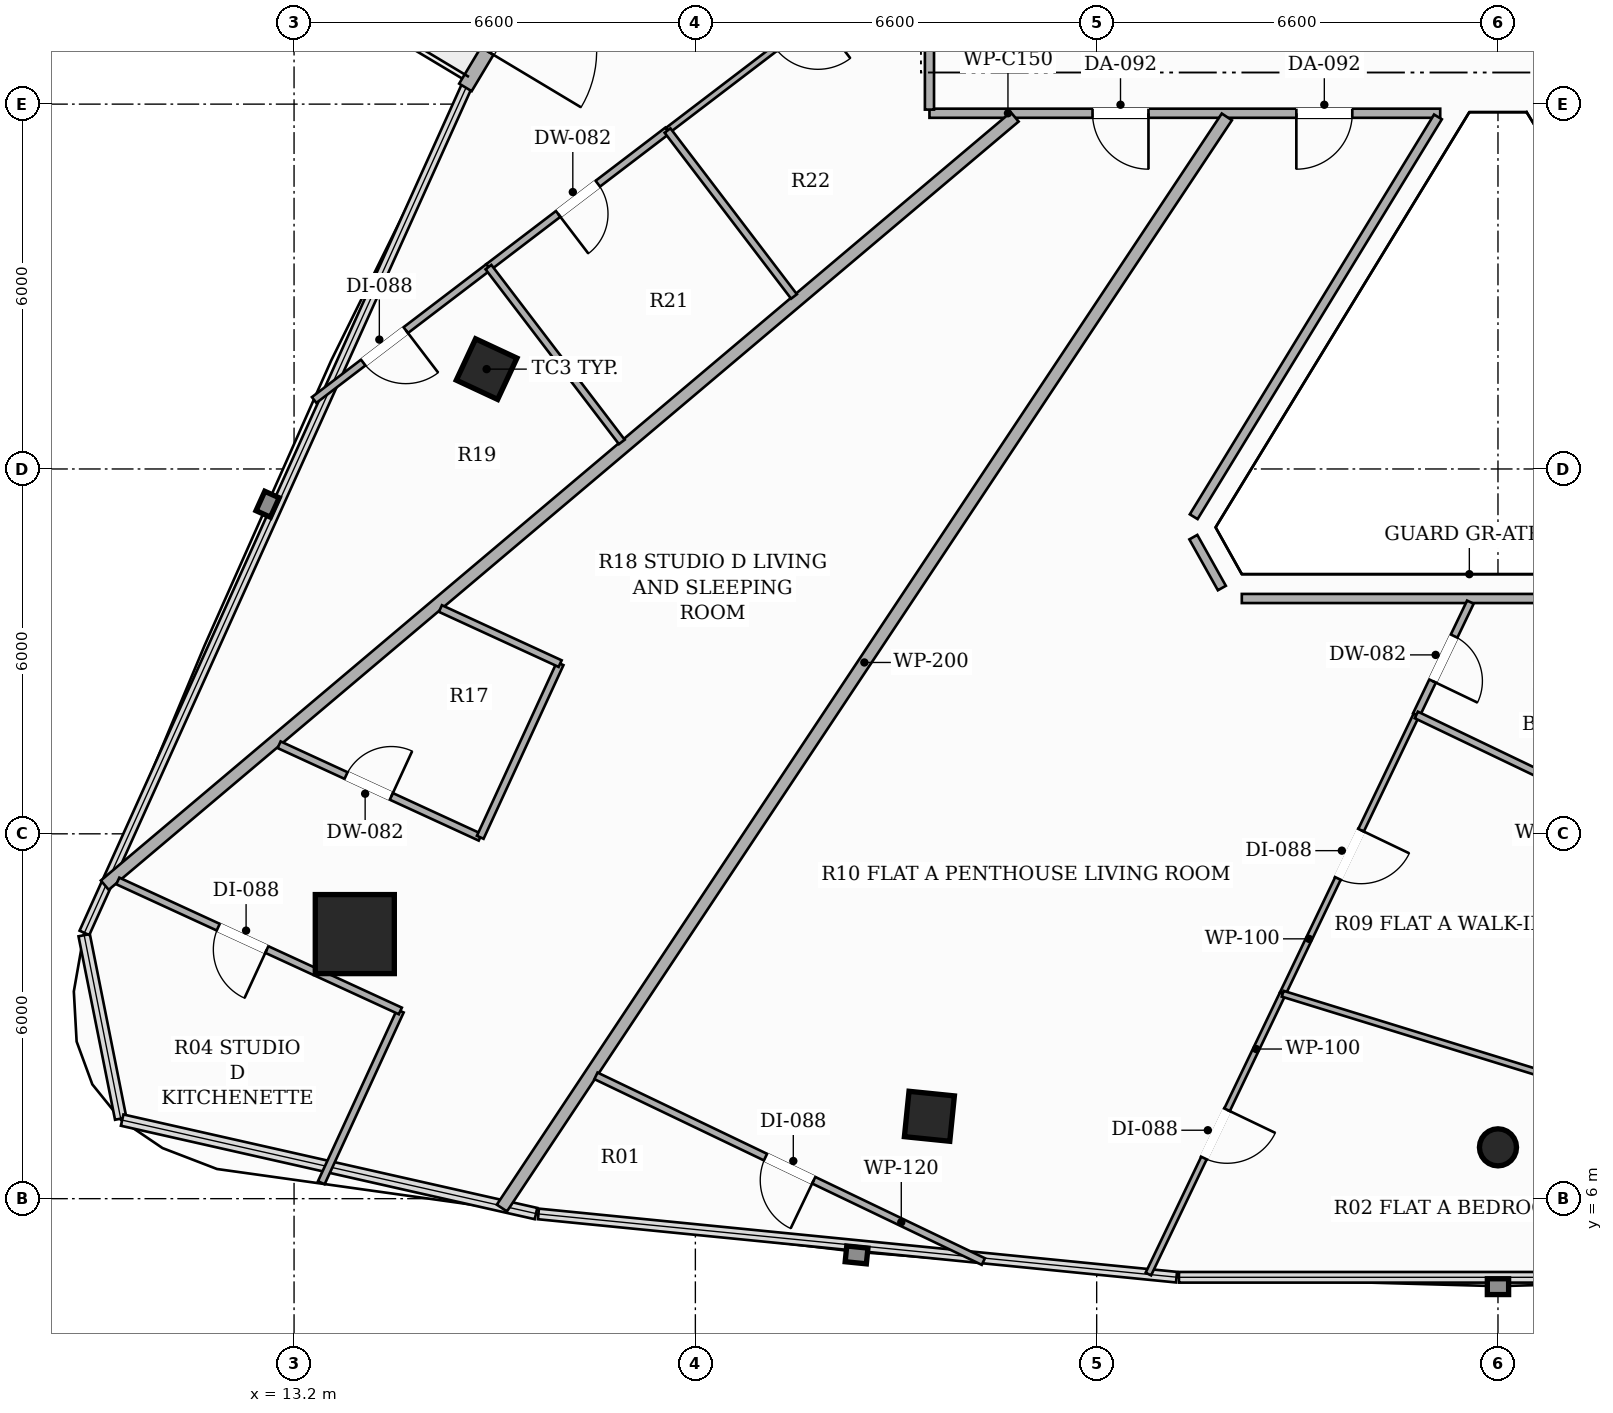
"""IFC4 building model, lengths in metres.
Left out: names, types, materials, properties, quantities, classifications, styles, units other than length and angle.
Written with IfcOpenShell. Run it as: python <this file> out.ifc"""

import sys

from ifc_helpers import new_model, si_unit, direction, frame, frame_2d, origin, origin_2d, place, context, subcontext, project, spatial, rectangle, hollow_rectangle, hollow_circle, extrude, element, fill, save


model = new_model("IFC4")
c1 = context("Model", 3, precision=1e-05, world=origin(), true_north=direction((0.0, 1.0)))
c2 = subcontext(c1, "Body", "Model", "MODEL_VIEW")
j1 = project(units=[si_unit("LENGTHUNIT", "METRE"), si_unit("PLANEANGLEUNIT", "RADIAN")], contexts=[c1])
p1 = place(None, origin())
s1 = spatial("IfcSite", under=j1, at=p1, CompositionType="ELEMENT")
p2 = place(p1, origin())
s2 = spatial("IfcBuilding", under=s1, at=p2, CompositionType="ELEMENT")
p3 = place(p2, frame((0.0, 0.0, 206.3)))
s3 = spatial("IfcBuildingStorey", under=s2, at=p3, CompositionType="ELEMENT", Elevation=206.3)
p4 = place(p3, frame((14.199, 10.351, 0.0), z_axis=(0.0, 0.0, 1.0), x_axis=(1.0, 0.0, 0.0)))
e1 = element("IfcColumn", 1, at=p4, inside=s3, PredefinedType="COLUMN", context=c2, shape_type="SweptSolid", body=[
    extrude(hollow_rectangle(XDim=1.3, YDim=1.3, WallThickness=0.04, at=origin_2d()), origin(), (0.0, 0.0, 1.0), 3.3),
])
for number, where, z_axis, x_axis in (
    (2, (16.367, 19.642, 0.0), (0.0, 0.0, 1.0), (0.423, 0.906, 0.0)),
    (3, (23.649, 7.355, 0.0), (0.0, 0.0, 1.0), (-0.995, 0.101, 0.0)),
):
    element("IfcColumn", number, at=place(p3, frame(where, z_axis=z_axis, x_axis=x_axis)), inside=s3, PredefinedType="COLUMN", context=c2, shape_type="SweptSolid", body=[
        extrude(hollow_rectangle(XDim=0.75, YDim=0.75, WallThickness=0.025, at=origin_2d()), origin(), (0.0, 0.0, 1.0), 3.3),
    ])
p5 = place(p3, frame((33.0, 6.844, 0.0), z_axis=(0.0, 0.0, 1.0), x_axis=(1.0, 0.0, 0.0)))
e4 = element("IfcColumn", 4, at=p5, inside=s3, PredefinedType="COLUMN", context=c2, shape_type="SweptSolid", body=[
    extrude(hollow_circle(Radius=0.305, WallThickness=0.016, at=origin_2d()), origin(), (0.0, 0.0, 1.0), 3.3),
])
p6 = place(p3, frame((21.353, 33.169, 0.0), z_axis=(0.0, 0.0, 1.0), x_axis=(-0.514391899557, -0.857555230682, 0.0)))
e5 = element("IfcWall", 5, at=p6, inside=s3, PredefinedType="SOLIDWALL", context=c2, shape_type="SweptSolid", body=[
    extrude(rectangle(XDim=10.371, YDim=0.24, at=frame_2d((5.186, 0.0))), origin(), (0.0, 0.0, 1.0), 2.624),
])
p7 = place(p6, frame((7.874, 0.0, 0.0)))
e6 = element("IfcOpeningElement", 6, at=p7, cuts=e5, PredefinedType="OPENING", context=c2, shape_type="SweptSolid", body=[
    extrude(rectangle(XDim=1.8, YDim=2.2, at=frame_2d((0.9, 1.1))), frame((0.0, 0.13, 0.0), z_axis=(0.0, -1.0, 0.0), x_axis=(1.0, 0.0, 0.0)), (0.0, 0.0, 1.0), 0.26),
])
p8 = place(p3, frame((32.05, 23.85, 0.0), z_axis=(0.0, 0.0, 1.0), x_axis=(-1.0, 0.0, 0.0)))
e7 = element("IfcWall", 7, at=p8, inside=s3, PredefinedType="PARTITIONING", context=c2, shape_type="SweptSolid", body=[
    extrude(rectangle(XDim=8.4, YDim=0.15, at=frame_2d((4.2, 0.0))), origin(), (0.0, 0.0, 1.0), 2.565),
])
p9 = place(p8, frame((1.446, 0.0, 0.0)))
e8 = element("IfcOpeningElement", 8, at=p9, cuts=e7, PredefinedType="OPENING", context=c2, shape_type="SweptSolid", body=[
    extrude(rectangle(XDim=0.92, YDim=2.15, at=frame_2d((0.46, 1.075))), frame((0.0, 0.085, 0.0), z_axis=(0.0, -1.0, 0.0), x_axis=(1.0, 0.0, 0.0)), (0.0, 0.0, 1.0), 0.17),
])
p10 = place(p8, frame((4.798, 0.0, 0.0)))
e9 = element("IfcOpeningElement", 9, at=p10, cuts=e7, PredefinedType="OPENING", context=c2, shape_type="SweptSolid", body=[
    extrude(rectangle(XDim=0.92, YDim=2.15, at=frame_2d((0.46, 1.075))), frame((0.0, 0.085, 0.0), z_axis=(0.0, -1.0, 0.0), x_axis=(1.0, 0.0, 0.0)), (0.0, 0.0, 1.0), 0.17),
])
p11 = place(p3, frame((23.65, 23.91, 0.0), z_axis=(0.0, 0.0, 1.0), x_axis=(0.0, 1.0, 0.0)))
e10 = element("IfcWall", 10, at=p11, inside=s3, PredefinedType="PARTITIONING", context=c2, shape_type="SweptSolid", body=[
    extrude(rectangle(XDim=12.439, YDim=0.15, at=frame_2d((6.22, 0.0))), origin(), (0.0, 0.0, 1.0), 2.492),
])
p12 = place(p11, frame((5.759, 0.0, 0.0)))
e11 = element("IfcOpeningElement", 11, at=p12, cuts=e10, PredefinedType="OPENING", context=c2, shape_type="SweptSolid", body=[
    extrude(rectangle(XDim=0.92, YDim=2.15, at=frame_2d((0.46, 1.075))), frame((0.0, 0.085, 0.0), z_axis=(0.0, -1.0, 0.0), x_axis=(1.0, 0.0, 0.0)), (0.0, 0.0, 1.0), 0.17),
])
p13 = place(p3, frame((37.213, 15.87, 0.0), z_axis=(0.0, 0.0, 1.0), x_axis=(-1.0, 0.0, 0.0)))
e12 = element("IfcWall", 12, at=p13, inside=s3, PredefinedType="PARTITIONING", context=c2, shape_type="SweptSolid", body=[
    extrude(rectangle(XDim=8.426, YDim=0.15, at=frame_2d((4.213, 0.0))), origin(), (0.0, 0.0, 1.0), 2.773),
])
p14 = place(p3, frame((28.459, 16.042, 0.0), z_axis=(0.0, 0.0, 1.0), x_axis=(-0.488859069364, 0.872362774481, 0.0)))
e13 = element("IfcWall", 13, at=p14, inside=s3, PredefinedType="PARTITIONING", context=c2, shape_type="SweptSolid", body=[
    extrude(rectangle(XDim=0.959, YDim=0.15, at=frame_2d((0.48, 0.0))), origin(), (0.0, 0.0, 1.0), 3.06),
])
p15 = place(p3, frame((27.996, 17.215, 0.0), z_axis=(0.0, 0.0, 1.0), x_axis=(0.521338496894, 0.853349970209, 0.0)))
e14 = element("IfcWall", 14, at=p15, inside=s3, PredefinedType="PARTITIONING", context=c2, shape_type="SweptSolid", body=[
    extrude(rectangle(XDim=7.705, YDim=0.15, at=frame_2d((3.853, 0.0))), origin(), (0.0, 0.0, 1.0), 2.773),
])
p16 = place(p3, frame((16.618, 5.846, 0.0), z_axis=(0.0, 0.0, 1.0), x_axis=(0.553425992232, 0.832898355817, 0.0)))
e15 = element("IfcWall", 15, at=p16, inside=s3, PredefinedType="PARTITIONING", context=c2, shape_type="SweptSolid", body=[
    extrude(rectangle(XDim=21.544, YDim=0.2, at=frame_2d((10.772, 0.0))), origin(), (0.0, 0.0, 1.0), 2.492),
])
p17 = place(p3, frame((10.087, 11.156, 0.0), z_axis=(0.0, 0.0, 1.0), x_axis=(0.76410924632, 0.645086862127, 0.0)))
e16 = element("IfcWall", 16, at=p17, inside=s3, PredefinedType="PARTITIONING", context=c2, shape_type="SweptSolid", body=[
    extrude(rectangle(XDim=19.585, YDim=0.2, at=frame_2d((9.792, 0.0))), origin(), (0.0, 0.0, 1.0), 2.492),
])
p18 = place(p3, frame((32.546, 15.81, 0.0), z_axis=(0.0, 0.0, 1.0), x_axis=(-0.43214833388, -0.90180253799, 0.0)))
e17 = element("IfcWall", 17, at=p18, inside=s3, PredefinedType="PARTITIONING", context=c2, shape_type="SweptSolid", body=[
    extrude(rectangle(XDim=2.057, YDim=0.12, at=frame_2d((1.028, 0.0))), origin(), (0.0, 0.0, 1.0), 3.06),
])
p19 = place(p18, frame((0.619, 0.0, 0.0)))
e18 = element("IfcOpeningElement", 18, at=p19, cuts=e17, PredefinedType="OPENING", context=c2, shape_type="SweptSolid", body=[
    extrude(rectangle(XDim=0.82, YDim=2.1, at=frame_2d((0.41, 1.05))), frame((0.0, 0.07, 0.0), z_axis=(0.0, -1.0, 0.0), x_axis=(1.0, 0.0, 0.0)), (0.0, 0.0, 1.0), 0.14),
])
p20 = place(p3, frame((24.536, 4.966, 0.0), z_axis=(0.0, 0.0, 1.0), x_axis=(-0.901746721557, 0.432264791721, 0.0)))
e19 = element("IfcWall", 19, at=p20, inside=s3, PredefinedType="PARTITIONING", context=c2, shape_type="SweptSolid", body=[
    extrude(rectangle(XDim=7.065, YDim=0.12, at=frame_2d((3.532, 0.0))), origin(), (0.0, 0.0, 1.0), 2.619),
])
p21 = place(p20, frame((3.093, 0.0, 0.0)))
e20 = element("IfcOpeningElement", 20, at=p21, cuts=e19, PredefinedType="OPENING", context=c2, shape_type="SweptSolid", body=[
    extrude(rectangle(XDim=0.88, YDim=2.1, at=frame_2d((0.44, 1.05))), frame((0.0, 0.07, 0.0), z_axis=(0.0, -1.0, 0.0), x_axis=(1.0, 0.0, 0.0)), (0.0, 0.0, 1.0), 0.14),
])
p22 = place(p3, frame((29.459, 9.37, 0.0), z_axis=(0.0, 0.0, 1.0), x_axis=(-0.43211613455, -0.901817967364, 0.0)))
e21 = element("IfcWall", 21, at=p22, inside=s3, PredefinedType="PARTITIONING", context=c2, shape_type="SweptSolid", body=[
    extrude(rectangle(XDim=5.112, YDim=0.1, at=frame_2d((2.556, 0.0))), origin(), (0.0, 0.0, 1.0), 2.492),
])
p23 = place(p22, frame((2.116, 0.0, 0.0)))
e22 = element("IfcOpeningElement", 22, at=p23, cuts=e21, PredefinedType="OPENING", context=c2, shape_type="SweptSolid", body=[
    extrude(rectangle(XDim=0.88, YDim=2.1, at=frame_2d((0.44, 1.05))), frame((0.0, 0.06, 0.0), z_axis=(0.0, -1.0, 0.0), x_axis=(1.0, 0.0, 0.0)), (0.0, 0.0, 1.0), 0.12),
])
p24 = place(p3, frame((31.657, 13.955, 0.0), z_axis=(0.0, 0.0, 1.0), x_axis=(-0.4322861352, -0.901736489954, 0.0)))
e23 = element("IfcWall", 23, at=p24, inside=s3, PredefinedType="PARTITIONING", context=c2, shape_type="SweptSolid", body=[
    extrude(rectangle(XDim=5.084, YDim=0.1, at=frame_2d((2.542, 0.0))), origin(), (0.0, 0.0, 1.0), 3.06),
])
p25 = place(p24, frame((2.102, 0.0, 0.0)))
e24 = element("IfcOpeningElement", 24, at=p25, cuts=e23, PredefinedType="OPENING", context=c2, shape_type="SweptSolid", body=[
    extrude(rectangle(XDim=0.88, YDim=2.1, at=frame_2d((0.44, 1.05))), frame((0.0, 0.06, 0.0), z_axis=(0.0, -1.0, 0.0), x_axis=(1.0, 0.0, 0.0)), (0.0, 0.0, 1.0), 0.12),
])
p26 = place(p3, frame((36.133, 11.81, 0.0), z_axis=(0.0, 0.0, 1.0), x_axis=(-0.901797658679, 0.432158515826, 0.0)))
e25 = element("IfcWall", 25, at=p26, inside=s3, PredefinedType="PARTITIONING", context=c2, shape_type="SweptSolid", body=[
    extrude(rectangle(XDim=4.964, YDim=0.12, at=frame_2d((2.482, 0.0))), origin(), (0.0, 0.0, 1.0), 2.773),
])
p27 = place(p3, frame((29.459, 9.37, 0.0), z_axis=(0.0, 0.0, 1.0), x_axis=(0.955559226726, -0.294799193044, 0.0)))
e26 = element("IfcWall", 26, at=p27, inside=s3, PredefinedType="PARTITIONING", context=c2, shape_type="SweptSolid", body=[
    extrude(rectangle(XDim=7.839, YDim=0.1, at=frame_2d((3.92, 0.0))), origin(), (0.0, 0.0, 1.0), 2.492),
])
p28 = place(p3, frame((12.954, 13.465, 0.0), z_axis=(0.0, 0.0, 1.0), x_axis=(0.908453283004, -0.41798640241, 0.0)))
e27 = element("IfcWall", 27, at=p28, inside=s3, PredefinedType="PARTITIONING", context=c2, shape_type="SweptSolid", body=[
    extrude(rectangle(XDim=3.641, YDim=0.12, at=frame_2d((1.821, 0.0))), origin(), (0.0, 0.0, 1.0), 2.492),
])
p29 = place(p28, frame((1.212, 0.0, 0.0)))
e28 = element("IfcOpeningElement", 28, at=p29, cuts=e27, PredefinedType="OPENING", context=c2, shape_type="SweptSolid", body=[
    extrude(rectangle(XDim=0.82, YDim=2.1, at=frame_2d((0.41, 1.05))), frame((0.0, 0.07, 0.0), z_axis=(0.0, -1.0, 0.0), x_axis=(1.0, 0.0, 0.0)), (0.0, 0.0, 1.0), 0.14),
])
p30 = place(p3, frame((16.262, 11.943, 0.0), z_axis=(0.0, 0.0, 1.0), x_axis=(0.417964576431, 0.908463324988, 0.0)))
e29 = element("IfcWall", 29, at=p30, inside=s3, PredefinedType="PARTITIONING", context=c2, shape_type="SweptSolid", body=[
    extrude(rectangle(XDim=3.144, YDim=0.12, at=frame_2d((1.572, 0.0))), origin(), (0.0, 0.0, 1.0), 2.565),
])
p31 = place(p3, frame((17.576, 14.799, 0.0), z_axis=(0.0, 0.0, 1.0), x_axis=(-0.908443405033, 0.418007870562, 0.0)))
e30 = element("IfcWall", 30, at=p31, inside=s3, PredefinedType="PARTITIONING", context=c2, shape_type="SweptSolid", body=[
    extrude(rectangle(XDim=2.167, YDim=0.12, at=frame_2d((1.084, 0.0))), origin(), (0.0, 0.0, 1.0), 2.492),
])
p32 = place(p3, frame((13.648, 6.262, 0.0), z_axis=(0.0, 0.0, 1.0), x_axis=(0.418057228076, 0.90842069222, 0.0)))
e31 = element("IfcWall", 31, at=p32, inside=s3, PredefinedType="PARTITIONING", context=c2, shape_type="SweptSolid", body=[
    extrude(rectangle(XDim=3.11, YDim=0.12, at=frame_2d((1.555, 0.0))), origin(), (0.0, 0.0, 1.0), 3.06),
])
p33 = place(p3, frame((14.948, 9.087, 0.0), z_axis=(0.0, 0.0, 1.0), x_axis=(-0.908447683715, 0.417998571712, 0.0)))
e32 = element("IfcWall", 32, at=p33, inside=s3, PredefinedType="PARTITIONING", context=c2, shape_type="SweptSolid", body=[
    extrude(rectangle(XDim=5.115, YDim=0.12, at=frame_2d((2.558, 0.0))), origin(), (0.0, 0.0, 1.0), 3.06),
])
p34 = place(p33, frame((2.417, 0.0, 0.0)))
e33 = element("IfcOpeningElement", 33, at=p34, cuts=e32, PredefinedType="OPENING", context=c2, shape_type="SweptSolid", body=[
    extrude(rectangle(XDim=0.88, YDim=2.1, at=frame_2d((0.44, 1.05))), frame((0.0, 0.07, 0.0), z_axis=(0.0, -1.0, 0.0), x_axis=(1.0, 0.0, 0.0)), (0.0, 0.0, 1.0), 0.14),
])
p35 = place(p3, frame((19.342, 23.566, 0.0), z_axis=(0.0, 0.0, 1.0), x_axis=(-0.795172892053, -0.606382776589, 0.0)))
e34 = element("IfcWall", 34, at=p35, inside=s3, PredefinedType="PARTITIONING", context=c2, shape_type="SweptSolid", body=[
    extrude(rectangle(XDim=3.704, YDim=0.12, at=frame_2d((1.852, 0.0))), origin(), (0.0, 0.0, 1.0), 2.492),
])
p36 = place(p35, frame((1.442, 0.0, 0.0)))
e35 = element("IfcOpeningElement", 35, at=p36, cuts=e34, PredefinedType="OPENING", context=c2, shape_type="SweptSolid", body=[
    extrude(rectangle(XDim=0.82, YDim=2.1, at=frame_2d((0.41, 1.05))), frame((0.0, 0.07, 0.0), z_axis=(0.0, -1.0, 0.0), x_axis=(1.0, 0.0, 0.0)), (0.0, 0.0, 1.0), 0.14),
])
p37 = place(p3, frame((16.397, 21.32, 0.0), z_axis=(0.0, 0.0, 1.0), x_axis=(-0.795204709159, -0.606341051333, 0.0)))
e36 = element("IfcWall", 36, at=p37, inside=s3, PredefinedType="PARTITIONING", context=c2, shape_type="SweptSolid", body=[
    extrude(rectangle(XDim=3.605, YDim=0.12, at=frame_2d((1.803, 0.0))), origin(), (0.0, 0.0, 1.0), 3.06),
])
p38 = place(p37, frame((1.71, 0.0, 0.0)))
e37 = element("IfcOpeningElement", 37, at=p38, cuts=e36, PredefinedType="OPENING", context=c2, shape_type="SweptSolid", body=[
    extrude(rectangle(XDim=0.88, YDim=2.1, at=frame_2d((0.44, 1.05))), frame((0.0, 0.07, 0.0), z_axis=(0.0, -1.0, 0.0), x_axis=(1.0, 0.0, 0.0)), (0.0, 0.0, 1.0), 0.14),
])
p39 = place(p3, frame((23.59, 26.805, 0.0), z_axis=(0.0, 0.0, 1.0), x_axis=(-0.795214502583, -0.606328207228, 0.0)))
e38 = element("IfcWall", 38, at=p39, inside=s3, PredefinedType="PARTITIONING", context=c2, shape_type="SweptSolid", body=[
    extrude(rectangle(XDim=5.342, YDim=0.1, at=frame_2d((2.671, 0.0))), origin(), (0.0, 0.0, 1.0), 2.773),
])
p40 = place(p39, frame((2.231, 0.0, 0.0)))
e39 = element("IfcOpeningElement", 39, at=p40, cuts=e38, PredefinedType="OPENING", context=c2, shape_type="SweptSolid", body=[
    extrude(rectangle(XDim=0.88, YDim=2.1, at=frame_2d((0.44, 1.05))), frame((0.0, 0.06, 0.0), z_axis=(0.0, -1.0, 0.0), x_axis=(1.0, 0.0, 0.0)), (0.0, 0.0, 1.0), 0.12),
])
p41 = place(p3, frame((18.59, 18.445, 0.0), z_axis=(0.0, 0.0, 1.0), x_axis=(-0.606504882674, 0.795079761591, 0.0)))
e40 = element("IfcWall", 40, at=p41, inside=s3, PredefinedType="PARTITIONING", context=c2, shape_type="SweptSolid", body=[
    extrude(rectangle(XDim=3.616, YDim=0.12, at=frame_2d((1.808, 0.0))), origin(), (0.0, 0.0, 1.0), 2.492),
])
p42 = place(p3, frame((19.342, 23.566, 0.0), z_axis=(0.0, 0.0, 1.0), x_axis=(0.60619754922, -0.795314108589, 0.0)))
e41 = element("IfcWall", 41, at=p42, inside=s3, PredefinedType="PARTITIONING", context=c2, shape_type="SweptSolid", body=[
    extrude(rectangle(XDim=3.431, YDim=0.12, at=frame_2d((1.716, 0.0))), origin(), (0.0, 0.0, 1.0), 2.773),
])
p43 = place(p9, origin())
e42 = element("IfcDoor", 42, at=p43, inside=s3, OperationType="SINGLE_SWING_RIGHT", PredefinedType="DOOR", context=c2, shape_type="SweptSolid", body=[
    extrude(rectangle(XDim=0.92, YDim=2.15, at=frame_2d((0.46, 1.075))), frame((0.0, 0.025, 0.0), z_axis=(0.0, -1.0, 0.0), x_axis=(1.0, 0.0, 0.0)), (0.0, 0.0, 1.0), 0.05),
])
fill(e8, e42)
p44 = place(p19, origin())
e43 = element("IfcDoor", 43, at=p44, inside=s3, OperationType="SINGLE_SWING_RIGHT", PredefinedType="DOOR", context=c2, shape_type="SweptSolid", body=[
    extrude(rectangle(XDim=0.82, YDim=2.1, at=frame_2d((0.41, 1.05))), frame((0.0, 0.025, 0.0), z_axis=(0.0, -1.0, 0.0), x_axis=(1.0, 0.0, 0.0)), (0.0, 0.0, 1.0), 0.05),
])
fill(e18, e43)
p45 = place(p21, origin())
e44 = element("IfcDoor", 44, at=p45, inside=s3, OperationType="SINGLE_SWING_LEFT", PredefinedType="DOOR", context=c2, shape_type="SweptSolid", body=[
    extrude(rectangle(XDim=0.88, YDim=2.1, at=frame_2d((0.44, 1.05))), frame((0.0, 0.025, 0.0), z_axis=(0.0, -1.0, 0.0), x_axis=(1.0, 0.0, 0.0)), (0.0, 0.0, 1.0), 0.05),
])
fill(e20, e44)
p46 = place(p23, origin())
e45 = element("IfcDoor", 45, at=p46, inside=s3, OperationType="SINGLE_SWING_LEFT", PredefinedType="DOOR", context=c2, shape_type="SweptSolid", body=[
    extrude(rectangle(XDim=0.88, YDim=2.1, at=frame_2d((0.44, 1.05))), frame((0.0, 0.025, 0.0), z_axis=(0.0, -1.0, 0.0), x_axis=(1.0, 0.0, 0.0)), (0.0, 0.0, 1.0), 0.05),
])
fill(e22, e45)
p47 = place(p25, origin())
e46 = element("IfcDoor", 46, at=p47, inside=s3, OperationType="SINGLE_SWING_LEFT", PredefinedType="DOOR", context=c2, shape_type="SweptSolid", body=[
    extrude(rectangle(XDim=0.88, YDim=2.1, at=frame_2d((0.44, 1.05))), frame((0.0, 0.025, 0.0), z_axis=(0.0, -1.0, 0.0), x_axis=(1.0, 0.0, 0.0)), (0.0, 0.0, 1.0), 0.05),
])
fill(e24, e46)
p48 = place(p10, origin())
e47 = element("IfcDoor", 47, at=p48, inside=s3, OperationType="SINGLE_SWING_LEFT", PredefinedType="DOOR", context=c2, shape_type="SweptSolid", body=[
    extrude(rectangle(XDim=0.92, YDim=2.15, at=frame_2d((0.46, 1.075))), frame((0.0, 0.025, 0.0), z_axis=(0.0, -1.0, 0.0), x_axis=(1.0, 0.0, 0.0)), (0.0, 0.0, 1.0), 0.05),
])
fill(e9, e47)
p49 = place(p29, origin())
e48 = element("IfcDoor", 48, at=p49, inside=s3, OperationType="SINGLE_SWING_RIGHT", PredefinedType="DOOR", context=c2, shape_type="SweptSolid", body=[
    extrude(rectangle(XDim=0.82, YDim=2.1, at=frame_2d((0.41, 1.05))), frame((0.0, 0.025, 0.0), z_axis=(0.0, -1.0, 0.0), x_axis=(1.0, 0.0, 0.0)), (0.0, 0.0, 1.0), 0.05),
])
fill(e28, e48)
p50 = place(p34, origin())
e49 = element("IfcDoor", 49, at=p50, inside=s3, OperationType="SINGLE_SWING_LEFT", PredefinedType="DOOR", context=c2, shape_type="SweptSolid", body=[
    extrude(rectangle(XDim=0.88, YDim=2.1, at=frame_2d((0.44, 1.05))), frame((0.0, 0.025, 0.0), z_axis=(0.0, -1.0, 0.0), x_axis=(1.0, 0.0, 0.0)), (0.0, 0.0, 1.0), 0.05),
])
fill(e33, e49)
p51 = place(p36, origin())
e50 = element("IfcDoor", 50, at=p51, inside=s3, OperationType="SINGLE_SWING_RIGHT", PredefinedType="DOOR", context=c2, shape_type="SweptSolid", body=[
    extrude(rectangle(XDim=0.82, YDim=2.1, at=frame_2d((0.41, 1.05))), frame((0.0, 0.025, 0.0), z_axis=(0.0, -1.0, 0.0), x_axis=(1.0, 0.0, 0.0)), (0.0, 0.0, 1.0), 0.05),
])
fill(e35, e50)
p52 = place(p38, origin())
e51 = element("IfcDoor", 51, at=p52, inside=s3, OperationType="SINGLE_SWING_LEFT", PredefinedType="DOOR", context=c2, shape_type="SweptSolid", body=[
    extrude(rectangle(XDim=0.88, YDim=2.1, at=frame_2d((0.44, 1.05))), frame((0.0, 0.025, 0.0), z_axis=(0.0, -1.0, 0.0), x_axis=(1.0, 0.0, 0.0)), (0.0, 0.0, 1.0), 0.05),
])
fill(e37, e51)
save(model, sys.argv[1])
